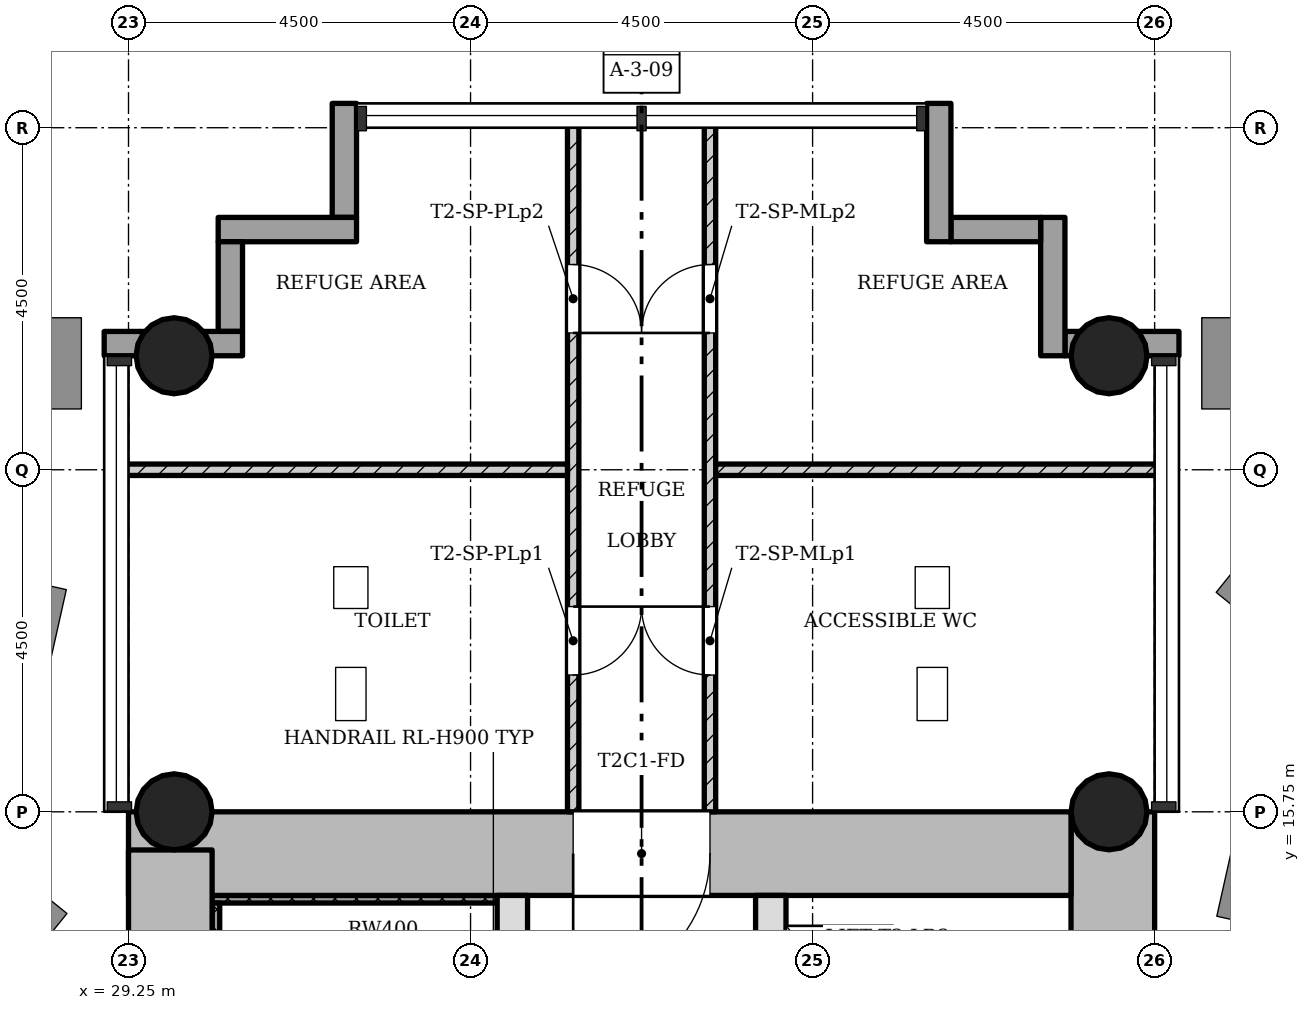
"""IFC4 building model, lengths in metres.
Left out: names, types, materials, properties, quantities, classifications, styles, units other than length and angle.
Written with IfcOpenShell. Run it as: python <this file> out.ifc"""

import sys

from ifc_helpers import new_model, si_unit, direction, frame, frame_2d, origin, origin_2d, place, context, subcontext, project, spatial, rectangle, hollow_circle, extrude, element, fill, save


model = new_model("IFC4")
c1 = context("Model", 3, precision=1e-05, world=origin(), true_north=direction((0.0, 1.0)))
c2 = subcontext(c1, "Body", "Model", "MODEL_VIEW")
j1 = project(units=[si_unit("LENGTHUNIT", "METRE"), si_unit("PLANEANGLEUNIT", "RADIAN")], contexts=[c1])
p1 = place(None, origin())
s1 = spatial("IfcSite", under=j1, at=p1, CompositionType="ELEMENT")
p2 = place(p1, origin())
s2 = spatial("IfcBuilding", under=s1, at=p2, CompositionType="ELEMENT")
p3 = place(p2, frame((0.0, 0.0, 72.1)))
s3 = spatial("IfcBuildingStorey", under=s2, at=p3, CompositionType="ELEMENT", Elevation=72.1)
p4 = place(p3, frame((42.2, 7.85, 0.0), z_axis=(0.0, 0.0, 1.0), x_axis=(0.0, 1.0, 0.0)))
e1 = element("IfcWall", 1, at=p4, inside=s3, PredefinedType="SHEAR", context=c2, shape_type="SweptSolid", body=[
    extrude(rectangle(XDim=7.9, YDim=1.1, at=frame_2d((3.95, 0.0))), origin(), (0.0, 0.0, 1.0), 4.5),
])
p5 = place(p3, frame((41.65, 15.2, 0.0), z_axis=(0.0, 0.0, 1.0), x_axis=(-1.0, 0.0, 0.0)))
e2 = element("IfcWall", 2, at=p5, inside=s3, PredefinedType="SHEAR", context=c2, shape_type="SweptSolid", body=[
    extrude(rectangle(XDim=12.4, YDim=1.1, at=frame_2d((6.2, 0.0))), origin(), (0.0, 0.0, 1.0), 4.5),
])
p6 = place(p5, frame((4.75, 0.0, 0.0)))
e3 = element("IfcOpeningElement", 3, at=p6, cuts=e2, PredefinedType="OPENING", context=c2, shape_type="SweptSolid", body=[
    extrude(rectangle(XDim=1.8, YDim=2.1, at=frame_2d((0.9, 1.05))), frame((0.0, 0.56, 0.0), z_axis=(0.0, -1.0, 0.0), x_axis=(1.0, 0.0, 0.0)), (0.0, 0.0, 1.0), 1.12),
])
p7 = place(p3, frame((29.8, 15.248, 0.0), z_axis=(0.0, 0.0, 1.0), x_axis=(0.0, -1.0, 0.0)))
e4 = element("IfcWall", 4, at=p7, inside=s3, PredefinedType="SHEAR", context=c2, shape_type="SweptSolid", body=[
    extrude(rectangle(XDim=8.596, YDim=1.1, at=frame_2d((4.298, 0.0))), origin(), (0.0, 0.0, 1.0), 4.5),
])
p8 = place(p3, frame((34.3, 7.85, 0.0), z_axis=(0.0, 0.0, 1.0), x_axis=(0.0, 1.0, 0.0)))
e5 = element("IfcWall", 5, at=p8, inside=s3, PredefinedType="SHEAR", context=c2, shape_type="SweptSolid", body=[
    extrude(rectangle(XDim=6.8, YDim=0.4, at=frame_2d((3.4, 0.0))), origin(), (0.0, 0.0, 1.0), 4.5),
])
p9 = place(p8, frame((0.55, 0.0, 0.0)))
e6 = element("IfcOpeningElement", 6, at=p9, cuts=e5, PredefinedType="OPENING", context=c2, shape_type="SweptSolid", body=[
    extrude(rectangle(XDim=0.9, YDim=2.1, at=frame_2d((0.45, 1.05))), frame((0.0, 0.21, 0.0), z_axis=(0.0, -1.0, 0.0), x_axis=(1.0, 0.0, 0.0)), (0.0, 0.0, 1.0), 0.42),
])
p10 = place(p3, frame((37.7, 7.85, 0.0), z_axis=(0.0, 0.0, 1.0), x_axis=(0.0, 1.0, 0.0)))
e7 = element("IfcWall", 7, at=p10, inside=s3, PredefinedType="SHEAR", context=c2, shape_type="SweptSolid", body=[
    extrude(rectangle(XDim=6.8, YDim=0.4, at=frame_2d((3.4, 0.0))), origin(), (0.0, 0.0, 1.0), 4.5),
])
p11 = place(p10, frame((0.65, 0.0, 0.0)))
e8 = element("IfcOpeningElement", 8, at=p11, cuts=e7, PredefinedType="OPENING", context=c2, shape_type="SweptSolid", body=[
    extrude(rectangle(XDim=1.1, YDim=2.1, at=frame_2d((0.55, 1.05))), frame((0.0, 0.21, 0.0), z_axis=(0.0, -1.0, 0.0), x_axis=(1.0, 0.0, 0.0)), (0.0, 0.0, 1.0), 0.42),
])
p12 = place(p10, frame((2.85, 0.0, 0.0)))
e9 = element("IfcOpeningElement", 9, at=p12, cuts=e7, PredefinedType="OPENING", context=c2, shape_type="SweptSolid", body=[
    extrude(rectangle(XDim=1.1, YDim=2.1, at=frame_2d((0.55, 1.05))), frame((0.0, 0.21, 0.0), z_axis=(0.0, -1.0, 0.0), x_axis=(1.0, 0.0, 0.0)), (0.0, 0.0, 1.0), 0.42),
])
p13 = place(p10, frame((5.05, 0.0, 0.0)))
e10 = element("IfcOpeningElement", 10, at=p13, cuts=e7, PredefinedType="OPENING", context=c2, shape_type="SweptSolid", body=[
    extrude(rectangle(XDim=1.1, YDim=2.1, at=frame_2d((0.55, 1.05))), frame((0.0, 0.21, 0.0), z_axis=(0.0, -1.0, 0.0), x_axis=(1.0, 0.0, 0.0)), (0.0, 0.0, 1.0), 0.42),
])
for number, where, z_axis, x_axis in (
    (11, (42.15, 15.75, 0.0), (0.0, 0.0, 1.0), (1.0, 0.0, 0.0)),
    (12, (29.85, 15.75, 0.0), (0.0, 0.0, 1.0), (1.0, 0.0, 0.0)),
    (13, (42.15, 21.75, 0.0), (0.0, 0.0, 1.0), (1.0, 0.0, 0.0)),
    (14, (29.85, 21.75, 0.0), (0.0, 0.0, 1.0), (1.0, 0.0, 0.0)),
):
    element("IfcColumn", number, at=place(p3, frame(where, z_axis=z_axis, x_axis=x_axis)), inside=s3, PredefinedType="COLUMN", context=c2, shape_type="SweptSolid", body=[
        extrude(hollow_circle(Radius=0.5, WallThickness=0.036, at=origin_2d()), origin(), (0.0, 0.0, 1.0), 4.5),
    ])
p14 = place(p3, frame((43.07, 21.91, -0.3), z_axis=(0.0, 0.0, 1.0), x_axis=(-1.0, 0.0, 0.0)))
e15 = element("IfcWall", 15, at=p14, inside=s3, PredefinedType="STANDARD", context=c2, shape_type="SweptSolid", body=[
    extrude(rectangle(XDim=1.5, YDim=0.32, at=frame_2d((0.75, 0.0))), origin(), (0.0, 0.0, 1.0), 4.5),
])
p15 = place(p3, frame((41.41, 21.75, -0.3), z_axis=(0.0, 0.0, 1.0), x_axis=(0.0, 1.0, 0.0)))
e16 = element("IfcWall", 16, at=p15, inside=s3, PredefinedType="STANDARD", context=c2, shape_type="SweptSolid", body=[
    extrude(rectangle(XDim=1.82, YDim=0.32, at=frame_2d((0.91, 0.0))), origin(), (0.0, 0.0, 1.0), 4.5),
])
p16 = place(p3, frame((41.25, 23.41, -0.3), z_axis=(0.0, 0.0, 1.0), x_axis=(-1.0, 0.0, 0.0)))
e17 = element("IfcWall", 17, at=p16, inside=s3, PredefinedType="STANDARD", context=c2, shape_type="SweptSolid", body=[
    extrude(rectangle(XDim=1.18, YDim=0.32, at=frame_2d((0.59, 0.0))), origin(), (0.0, 0.0, 1.0), 4.5),
])
p17 = place(p3, frame((39.91, 23.25, -0.3), z_axis=(0.0, 0.0, 1.0), x_axis=(0.0, 1.0, 0.0)))
e18 = element("IfcWall", 18, at=p17, inside=s3, PredefinedType="STANDARD", context=c2, shape_type="SweptSolid", body=[
    extrude(rectangle(XDim=1.82, YDim=0.32, at=frame_2d((0.91, 0.0))), origin(), (0.0, 0.0, 1.0), 4.5),
])
p18 = place(p3, frame((32.09, 25.07, -0.3), z_axis=(0.0, 0.0, 1.0), x_axis=(0.0, -1.0, 0.0)))
e19 = element("IfcWall", 19, at=p18, inside=s3, PredefinedType="STANDARD", context=c2, shape_type="SweptSolid", body=[
    extrude(rectangle(XDim=1.5, YDim=0.32, at=frame_2d((0.75, 0.0))), origin(), (0.0, 0.0, 1.0), 4.5),
])
p19 = place(p3, frame((32.25, 23.41, -0.3), z_axis=(0.0, 0.0, 1.0), x_axis=(-1.0, 0.0, 0.0)))
e20 = element("IfcWall", 20, at=p19, inside=s3, PredefinedType="STANDARD", context=c2, shape_type="SweptSolid", body=[
    extrude(rectangle(XDim=1.82, YDim=0.32, at=frame_2d((0.91, 0.0))), origin(), (0.0, 0.0, 1.0), 4.5),
])
p20 = place(p3, frame((30.59, 23.25, -0.3), z_axis=(0.0, 0.0, 1.0), x_axis=(0.0, -1.0, 0.0)))
e21 = element("IfcWall", 21, at=p20, inside=s3, PredefinedType="STANDARD", context=c2, shape_type="SweptSolid", body=[
    extrude(rectangle(XDim=1.18, YDim=0.32, at=frame_2d((0.59, 0.0))), origin(), (0.0, 0.0, 1.0), 4.5),
])
p21 = place(p3, frame((30.75, 21.91, -0.3), z_axis=(0.0, 0.0, 1.0), x_axis=(-1.0, 0.0, 0.0)))
e22 = element("IfcWall", 22, at=p21, inside=s3, PredefinedType="STANDARD", context=c2, shape_type="SweptSolid", body=[
    extrude(rectangle(XDim=1.82, YDim=0.32, at=frame_2d((0.91, 0.0))), origin(), (0.0, 0.0, 1.0), 4.5),
])
p22 = place(p3, frame((35.1, 15.75, 0.0), z_axis=(0.0, 0.0, 1.0), x_axis=(0.0, 1.0, 0.0)))
e23 = element("IfcWall", 23, at=p22, inside=s3, PredefinedType="PARTITIONING", context=c2, shape_type="SweptSolid", body=[
    extrude(rectangle(XDim=9.1, YDim=0.15, at=frame_2d((4.55, 0.0))), origin(), (0.0, 0.0, 1.0), 4.08),
])
p23 = place(p22, frame((1.8, 0.0, 0.0)))
e24 = element("IfcOpeningElement", 24, at=p23, cuts=e23, PredefinedType="OPENING", context=c2, shape_type="SweptSolid", body=[
    extrude(rectangle(XDim=0.9, YDim=2.1, at=frame_2d((0.45, 1.05))), frame((0.0, 0.085, 0.0), z_axis=(0.0, -1.0, 0.0), x_axis=(1.0, 0.0, 0.0)), (0.0, 0.0, 1.0), 0.17),
])
p24 = place(p22, frame((6.3, 0.0, 0.0)))
e25 = element("IfcOpeningElement", 25, at=p24, cuts=e23, PredefinedType="OPENING", context=c2, shape_type="SweptSolid", body=[
    extrude(rectangle(XDim=0.9, YDim=2.1, at=frame_2d((0.45, 1.05))), frame((0.0, 0.085, 0.0), z_axis=(0.0, -1.0, 0.0), x_axis=(1.0, 0.0, 0.0)), (0.0, 0.0, 1.0), 0.17),
])
p25 = place(p3, frame((35.025, 20.25, 0.0), z_axis=(0.0, 0.0, 1.0), x_axis=(-1.0, 0.0, 0.0)))
e26 = element("IfcWall", 26, at=p25, inside=s3, PredefinedType="PARTITIONING", context=c2, shape_type="SweptSolid", body=[
    extrude(rectangle(XDim=5.875, YDim=0.15, at=frame_2d((2.938, 0.0))), origin(), (0.0, 0.0, 1.0), 4.08),
])
p26 = place(p3, frame((36.9, 15.75, 0.0), z_axis=(0.0, 0.0, 1.0), x_axis=(0.0, 1.0, 0.0)))
e27 = element("IfcWall", 27, at=p26, inside=s3, PredefinedType="PARTITIONING", context=c2, shape_type="SweptSolid", body=[
    extrude(rectangle(XDim=9.1, YDim=0.15, at=frame_2d((4.55, 0.0))), origin(), (0.0, 0.0, 1.0), 4.08),
])
p27 = place(p26, frame((1.8, 0.0, 0.0)))
e28 = element("IfcOpeningElement", 28, at=p27, cuts=e27, PredefinedType="OPENING", context=c2, shape_type="SweptSolid", body=[
    extrude(rectangle(XDim=0.9, YDim=2.1, at=frame_2d((0.45, 1.05))), frame((0.0, 0.085, 0.0), z_axis=(0.0, -1.0, 0.0), x_axis=(1.0, 0.0, 0.0)), (0.0, 0.0, 1.0), 0.17),
])
p28 = place(p26, frame((6.3, 0.0, 0.0)))
e29 = element("IfcOpeningElement", 29, at=p28, cuts=e27, PredefinedType="OPENING", context=c2, shape_type="SweptSolid", body=[
    extrude(rectangle(XDim=0.9, YDim=2.1, at=frame_2d((0.45, 1.05))), frame((0.0, 0.085, 0.0), z_axis=(0.0, -1.0, 0.0), x_axis=(1.0, 0.0, 0.0)), (0.0, 0.0, 1.0), 0.17),
])
p29 = place(p3, frame((36.975, 20.25, 0.0), z_axis=(0.0, 0.0, 1.0), x_axis=(1.0, 0.0, 0.0)))
e30 = element("IfcWall", 30, at=p29, inside=s3, PredefinedType="PARTITIONING", context=c2, shape_type="SweptSolid", body=[
    extrude(rectangle(XDim=5.875, YDim=0.15, at=frame_2d((2.938, 0.0))), origin(), (0.0, 0.0, 1.0), 4.08),
])
p30 = place(p3, frame((34.1, 14.6, 0.0), z_axis=(0.0, 0.0, 1.0), x_axis=(-1.0, 0.0, 0.0)))
e31 = element("IfcWall", 31, at=p30, inside=s3, PredefinedType="SHEAR", context=c2, shape_type="SweptSolid", body=[
    extrude(rectangle(XDim=3.75, YDim=0.1, at=frame_2d((1.875, 0.0))), origin(), (0.0, 0.0, 1.0), 4.5),
])
p31 = place(p3, frame((30.4, 7.95, 0.0), z_axis=(0.0, 0.0, 1.0), x_axis=(0.0, 1.0, 0.0)))
e32 = element("IfcWall", 32, at=p31, inside=s3, PredefinedType="SHEAR", context=c2, shape_type="SweptSolid", body=[
    extrude(rectangle(XDim=6.6, YDim=0.1, at=frame_2d((3.3, 0.0))), origin(), (0.0, 0.0, 1.0), 4.5),
])
p32 = place(p23, origin())
e33 = element("IfcDoor", 33, at=p32, inside=s3, OperationType="SINGLE_SWING_RIGHT", PredefinedType="DOOR", context=c2, shape_type="SweptSolid", body=[
    extrude(rectangle(XDim=0.9, YDim=2.1, at=frame_2d((0.45, 1.05))), frame((0.0, 0.025, 0.0), z_axis=(0.0, -1.0, 0.0), x_axis=(1.0, 0.0, 0.0)), (0.0, 0.0, 1.0), 0.05),
])
fill(e24, e33)
p33 = place(p24, origin())
e34 = element("IfcDoor", 34, at=p33, inside=s3, OperationType="SINGLE_SWING_LEFT", PredefinedType="DOOR", context=c2, shape_type="SweptSolid", body=[
    extrude(rectangle(XDim=0.9, YDim=2.1, at=frame_2d((0.45, 1.05))), frame((0.0, 0.025, 0.0), z_axis=(0.0, -1.0, 0.0), x_axis=(1.0, 0.0, 0.0)), (0.0, 0.0, 1.0), 0.05),
])
fill(e25, e34)
p34 = place(p27, origin())
e35 = element("IfcDoor", 35, at=p34, inside=s3, OperationType="SINGLE_SWING_LEFT", PredefinedType="DOOR", context=c2, shape_type="SweptSolid", body=[
    extrude(rectangle(XDim=0.9, YDim=2.1, at=frame_2d((0.45, 1.05))), frame((0.0, 0.025, 0.0), z_axis=(0.0, -1.0, 0.0), x_axis=(1.0, 0.0, 0.0)), (0.0, 0.0, 1.0), 0.05),
])
fill(e28, e35)
p35 = place(p28, origin())
e36 = element("IfcDoor", 36, at=p35, inside=s3, OperationType="SINGLE_SWING_RIGHT", PredefinedType="DOOR", context=c2, shape_type="SweptSolid", body=[
    extrude(rectangle(XDim=0.9, YDim=2.1, at=frame_2d((0.45, 1.05))), frame((0.0, 0.025, 0.0), z_axis=(0.0, -1.0, 0.0), x_axis=(1.0, 0.0, 0.0)), (0.0, 0.0, 1.0), 0.05),
])
fill(e29, e36)
p36 = place(p6, origin())
e37 = element("IfcDoor", 37, at=p36, inside=s3, OperationType="SINGLE_SWING_LEFT", PredefinedType="DOOR", context=c2, shape_type="SweptSolid", body=[
    extrude(rectangle(XDim=1.8, YDim=2.1, at=frame_2d((0.9, 1.05))), frame((0.0, 0.025, 0.0), z_axis=(0.0, -1.0, 0.0), x_axis=(1.0, 0.0, 0.0)), (0.0, 0.0, 1.0), 0.05),
])
fill(e3, e37)
save(model, sys.argv[1])
